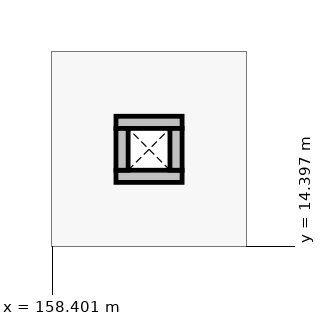
"""IFC4 building model, lengths in metres.
Left out: names, types, materials, properties, quantities, classifications, styles, units other than length and angle.
Written with IfcOpenShell. Run it as: python <this file> out.ifc"""

import sys

from ifc_helpers import new_model, si_unit, direction, frame, frame_2d, origin, place, context, subcontext, project, spatial, rectangle, extrude, element, save


model = new_model("IFC4")
c1 = context("Model", 3, precision=1e-05, world=origin(), true_north=direction((0.0, 1.0)))
c2 = subcontext(c1, "Body", "Model", "MODEL_VIEW")
j1 = project(units=[si_unit("LENGTHUNIT", "METRE"), si_unit("PLANEANGLEUNIT", "RADIAN")], contexts=[c1])
p1 = place(None, origin())
s1 = spatial("IfcSite", under=j1, at=p1, CompositionType="ELEMENT")
p2 = place(p1, origin())
s2 = spatial("IfcBuilding", under=s1, at=p2, CompositionType="ELEMENT")
p3 = place(p2, frame((0.0, 0.0, 4.8)))
s3 = spatial("IfcBuildingStorey", under=s2, at=p3, CompositionType="ELEMENT", Elevation=4.8)
for number, where, z_axis, x_axis in (
    (1, (159.24, 15.32, 0.0), (0.0, 0.0, 1.0), (1.0, 0.0, 0.0)),
    (2, (159.24, 16.03, 0.0), (0.0, 0.0, 1.0), (1.0, 0.0, 0.0)),
):
    element("IfcWall", number, at=place(p3, frame(where, z_axis=z_axis, x_axis=x_axis)), inside=s3, PredefinedType="PARTITIONING", context=c2, shape_type="SweptSolid", body=[
        extrude(rectangle(XDim=0.87, YDim=0.16, at=frame_2d((0.435, 0.0))), origin(), (0.0, 0.0, 1.0), 3.35),
    ])
for number, where, z_axis, x_axis in (
    (3, (159.32, 15.4, 0.0), (0.0, 0.0, 1.0), (0.0, 1.0, 0.0)),
    (4, (160.03, 15.4, 0.0), (0.0, 0.0, 1.0), (0.0, 1.0, 0.0)),
):
    element("IfcWall", number, at=place(p3, frame(where, z_axis=z_axis, x_axis=x_axis)), inside=s3, PredefinedType="PARTITIONING", context=c2, shape_type="SweptSolid", body=[
        extrude(rectangle(XDim=0.55, YDim=0.16, at=frame_2d((0.275, 0.0))), origin(), (0.0, 0.0, 1.0), 3.35),
    ])
save(model, sys.argv[1])
